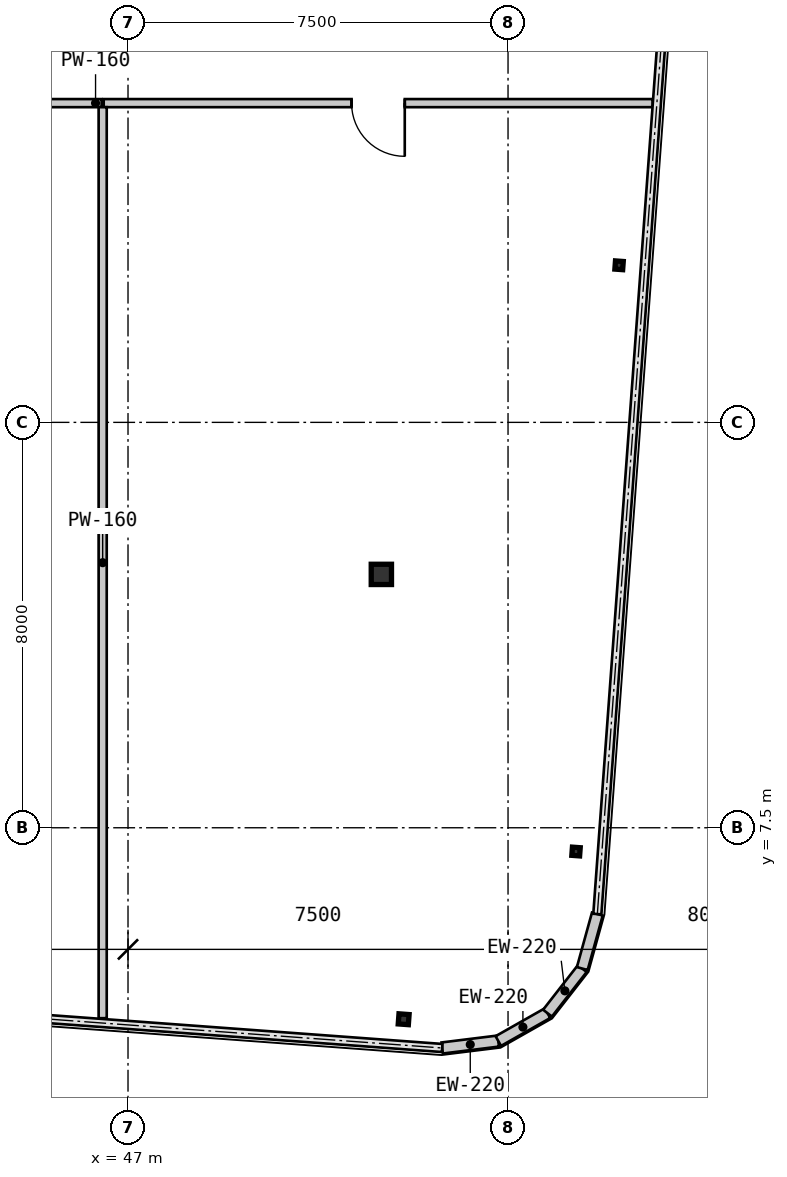
"""IFC4 building model, lengths in metres.
Left out: names, types, materials, properties, quantities, classifications, styles, units other than length and angle.
Written with IfcOpenShell. Run it as: python <this file> out.ifc"""

import sys

from ifc_helpers import new_model, si_unit, direction, frame, frame_2d, origin, origin_2d, place, context, subcontext, project, spatial, rectangle, hollow_rectangle, i_section, extrude, source, transform, mapped, element, fill, save


model = new_model("IFC4")
c1 = context("Model", 3, precision=1e-05, world=origin(), true_north=direction((0.0, 1.0)))
c2 = subcontext(c1, "Body", "Model", "MODEL_VIEW")
j1 = project(units=[si_unit("LENGTHUNIT", "METRE"), si_unit("PLANEANGLEUNIT", "RADIAN")], contexts=[c1])
p1 = place(None, origin())
s1 = spatial("IfcSite", under=j1, at=p1, CompositionType="ELEMENT")
p2 = place(p1, origin())
s2 = spatial("IfcBuilding", under=s1, at=p2, CompositionType="ELEMENT")
p3 = place(p2, frame((0.0, 0.0, 230.3)))
s3 = spatial("IfcBuildingStorey", under=s2, at=p3, CompositionType="ELEMENT", Elevation=230.3)
m1 = source(origin(), c2, "Body", "SweptSolid", [
    extrude(hollow_rectangle(XDim=0.4, YDim=0.4, WallThickness=0.016, at=origin_2d()), origin(), (0.0, 0.0, 1.0), 3.15),
])
p4 = place(p3, frame((52.0, 12.5, 0.0), z_axis=(0.0, 0.0, 1.0), x_axis=(1.0, 0.0, 0.0)))
e1 = element("IfcColumn", 1, at=p4, inside=s3, PredefinedType="COLUMN", context=c2, shape_type="MappedRepresentation", body=[
    mapped(m1, transform((0.0, 0.0, 0.0), scale=1.0)),
])
m2 = source(origin(), c2, "Body", "SweptSolid", [
    extrude(hollow_rectangle(XDim=0.2, YDim=0.2, WallThickness=0.009, at=origin_2d()), origin(), (0.0, 0.0, 1.0), 3.15),
])
p5 = place(p3, frame((52.44, 3.721, 0.0), z_axis=(0.0, 0.0, 1.0), x_axis=(0.997314477224, -0.073238197128, 0.0)))
e2 = element("IfcColumn", 2, at=p5, inside=s3, PredefinedType="COLUMN", context=c2, shape_type="MappedRepresentation", body=[
    mapped(m2, transform((0.0, 0.0, 0.0), scale=1.0)),
])
m3 = source(origin(), c2, "Body", "SweptSolid", [
    extrude(i_section(OverallWidth=0.154, OverallDepth=0.162, WebThickness=0.008, FlangeThickness=0.011, at=origin_2d()), origin(), (0.0, 0.0, 1.0), 3.15),
])
for number, where, z_axis, x_axis in (
    (3, (55.842, 7.031, 0.0), (0.0, 0.0, 1.0), (0.997, -0.073, 0.0)),
    (4, (56.691, 18.6, 0.0), (0.0, 0.0, 1.0), (0.997, -0.073, 0.0)),
):
    element("IfcColumn", number, at=place(p3, frame(where, z_axis=z_axis, x_axis=x_axis)), inside=s3, PredefinedType="COLUMN", context=c2, shape_type="MappedRepresentation", body=[
        mapped(m3, transform((0.0, 0.0, 0.0), scale=1.0)),
    ])
m4 = source(origin(), c2, "Body", "SweptSolid", [
    extrude(rectangle(XDim=1.116, YDim=0.22, at=frame_2d((0.558, 0.0))), origin(), (0.0, 0.0, 1.0), 2.93),
])
p6 = place(p3, frame((53.201, 3.154, 0.0), z_axis=(0.0, 0.0, 1.0), x_axis=(0.992438604032, 0.122742076028, 0.0)))
e5 = element("IfcWall", 5, at=p6, inside=s3, PredefinedType="SOLIDWALL", context=c2, shape_type="MappedRepresentation", body=[
    mapped(m4, transform((0.0, 0.0, 0.0), scale=1.0)),
])
m5 = source(origin(), c2, "Body", "SweptSolid", [
    extrude(rectangle(XDim=1.116, YDim=0.22, at=frame_2d((0.558, 0.0))), origin(), (0.0, 0.0, 1.0), 2.93),
])
p7 = place(p3, frame((54.308, 3.291, 0.0), z_axis=(0.0, 0.0, 1.0), x_axis=(0.869893934693, 0.49323882895, 0.0)))
e6 = element("IfcWall", 6, at=p7, inside=s3, PredefinedType="SOLIDWALL", context=c2, shape_type="MappedRepresentation", body=[
    mapped(m5, transform((0.0, 0.0, 0.0), scale=1.0)),
])
for number, where, z_axis, x_axis in (
    (7, (55.279, 3.841, 0.0), (0.0, 0.0, 1.0), (0.615, 0.789, 0.0)),
    (8, (55.965, 4.721, 0.0), (0.0, 0.0, 1.0), (0.266, 0.964, 0.0)),
):
    element("IfcWall", number, at=place(p3, frame(where, z_axis=z_axis, x_axis=x_axis)), inside=s3, PredefinedType="SOLIDWALL", context=c2, shape_type="MappedRepresentation", body=[
        mapped(m4, transform((0.0, 0.0, 0.0), scale=1.0)),
    ])
m6 = source(origin(), c2, "Body", "SweptSolid", [
    extrude(rectangle(XDim=6.53, YDim=0.16, at=frame_2d((3.265, 0.0))), origin(), (0.0, 0.0, 1.0), 2.93),
])
p8 = place(p3, frame((46.48, 21.8, 0.0), z_axis=(0.0, 0.0, 1.0), x_axis=(-1.0, 0.0, 0.0)))
e9 = element("IfcWall", 9, at=p8, inside=s3, PredefinedType="PARTITIONING", context=c2, shape_type="MappedRepresentation", body=[
    mapped(m6, transform((0.0, 0.0, 0.0), scale=1.0)),
])
m7 = source(origin(), c2, "Body", "SweptSolid", [
    extrude(rectangle(XDim=1.05, YDim=2.1, at=frame_2d((0.525, 1.05))), frame((0.0, 0.09, 0.0), z_axis=(0.0, -1.0, 0.0), x_axis=(1.0, 0.0, 0.0)), (0.0, 0.0, 1.0), 0.18),
])
p9 = place(p8, frame((5.032, 0.0, 0.0)))
e10 = element("IfcOpeningElement", 10, at=p9, cuts=e9, PredefinedType="OPENING", context=c2, shape_type="MappedRepresentation", body=[
    mapped(m7, transform((0.0, 0.0, 0.0), scale=1.0)),
])
m8 = source(origin(), c2, "Body", "SweptSolid", [
    extrude(rectangle(XDim=10.833, YDim=0.16, at=frame_2d((5.417, 0.0))), origin(), (0.0, 0.0, 1.0), 2.93),
])
p10 = place(p3, frame((57.353, 21.8, 0.0), z_axis=(0.0, 0.0, 1.0), x_axis=(-1.0, 0.0, 0.0)))
e11 = element("IfcWall", 11, at=p10, inside=s3, PredefinedType="PARTITIONING", context=c2, shape_type="MappedRepresentation", body=[
    mapped(m8, transform((0.0, 0.0, 0.0), scale=1.0)),
])
p11 = place(p10, frame((4.892, 0.0, 0.0)))
e12 = element("IfcOpeningElement", 12, at=p11, cuts=e11, PredefinedType="OPENING", context=c2, shape_type="MappedRepresentation", body=[
    mapped(m7, transform((0.0, 0.0, 0.0), scale=1.0)),
])
m9 = source(origin(), c2, "Body", "SweptSolid", [
    extrude(rectangle(XDim=17.978, YDim=0.16, at=frame_2d((8.989, 0.0))), origin(), (0.0, 0.0, 1.0), 2.93),
])
p12 = place(p3, frame((46.5, 21.72, 0.0), z_axis=(0.0, 0.0, 1.0), x_axis=(0.0, -1.0, 0.0)))
e13 = element("IfcWall", 13, at=p12, inside=s3, PredefinedType="PARTITIONING", context=c2, shape_type="MappedRepresentation", body=[
    mapped(m9, transform((0.0, 0.0, 0.0), scale=1.0)),
])
m10 = source(origin(), c2, "Body", "SweptSolid", [
    extrude(rectangle(XDim=1.05, YDim=2.1, at=frame_2d((0.525, 1.05))), frame((0.0, 0.025, 0.0), z_axis=(0.0, -1.0, 0.0), x_axis=(1.0, 0.0, 0.0)), (0.0, 0.0, 1.0), 0.05),
])
p13 = place(p11, origin())
e14 = element("IfcDoor", 14, at=p13, inside=s3, OperationType="SINGLE_SWING_LEFT", PredefinedType="DOOR", context=c2, shape_type="MappedRepresentation", body=[
    mapped(m10, transform((0.0, 0.0, 0.0), scale=1.0)),
])
fill(e12, e14)
save(model, sys.argv[1])
